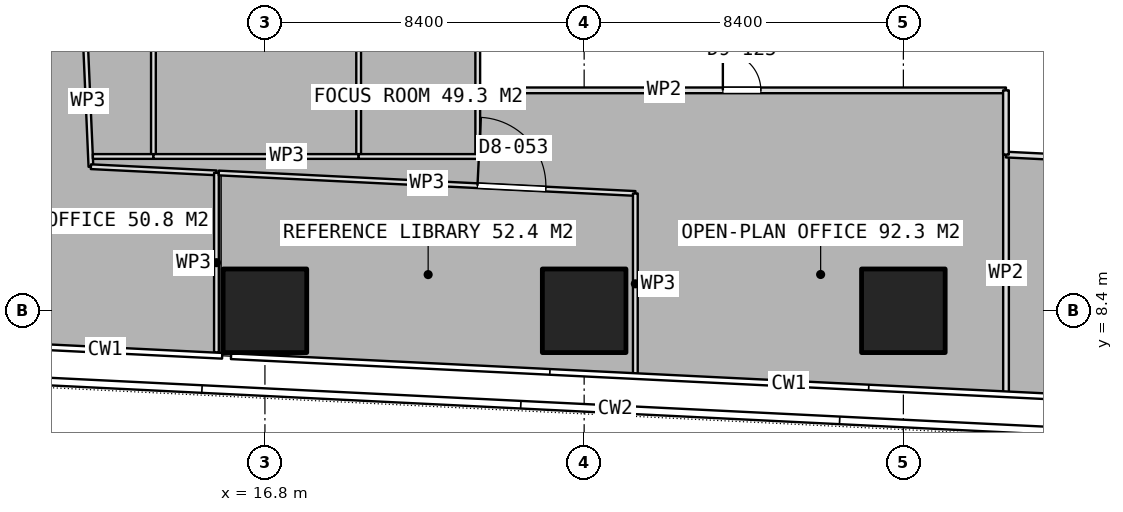
"""IFC4 building model, lengths in metres.
Left out: names, types, materials, properties, quantities, classifications, styles, units other than length and angle.
Written with IfcOpenShell. Run it as: python <this file> out.ifc"""

import sys

from ifc_helpers import new_model, si_unit, direction, frame, frame_2d, origin, origin_2d, place, context, subcontext, project, spatial, rectangle, extrude, element, fill, save


model = new_model("IFC4")
c1 = context("Model", 3, precision=1e-05, world=origin(), true_north=direction((0.0, 1.0)))
c2 = subcontext(c1, "Body", "Model", "MODEL_VIEW")
j1 = project(units=[si_unit("LENGTHUNIT", "METRE"), si_unit("PLANEANGLEUNIT", "RADIAN")], contexts=[c1])
p1 = place(None, origin())
s1 = spatial("IfcSite", under=j1, at=p1, CompositionType="ELEMENT")
p2 = place(p1, origin())
s2 = spatial("IfcBuilding", under=s1, at=p2, CompositionType="ELEMENT")
p3 = place(p2, frame((0.0, 0.0, 47.9)))
s3 = spatial("IfcBuildingStorey", under=s2, at=p3, CompositionType="ELEMENT", Elevation=47.9)
for number, where, z_axis, x_axis in (
    (1, (16.8, 8.4, 0.0), (0.0, 0.0, 1.0), (1.0, 0.0, 0.0)),
    (2, (25.2, 8.4, 0.0), (0.0, 0.0, 1.0), (1.0, 0.0, 0.0)),
    (3, (33.6, 8.4, 0.0), (0.0, 0.0, 1.0), (1.0, 0.0, 0.0)),
):
    element("IfcColumn", number, at=place(p3, frame(where, z_axis=z_axis, x_axis=x_axis)), inside=s3, PredefinedType="COLUMN", context=c2, shape_type="SweptSolid", body=[
        extrude(rectangle(XDim=2.2, YDim=2.2, at=origin_2d()), origin(), (0.0, 0.0, 1.0), 3.75),
    ])
p4 = place(p3, frame((36.301, 6.253, 0.0), z_axis=(0.0, 0.0, 1.0), x_axis=(0.0, 1.0, 0.0)))
e4 = element("IfcWall", 4, at=p4, inside=s3, PredefinedType="PARTITIONING", context=c2, shape_type="SweptSolid", body=[
    extrude(rectangle(XDim=6.257, YDim=0.15, at=frame_2d((3.128, 0.0))), origin(), (0.0, 0.0, 1.0), 3.5),
])
p5 = place(p3, frame((36.301, 12.51, 0.0), z_axis=(0.0, 0.0, 1.0), x_axis=(0.998801323594, -0.048948094823, 0.0)))
e5 = element("IfcWall", 5, at=p5, inside=s3, PredefinedType="PARTITIONING", context=c2, shape_type="SweptSolid", body=[
    extrude(rectangle(XDim=3.003, YDim=0.15, at=frame_2d((1.501, 0.0))), origin(), (0.0, 0.0, 1.0), 3.5),
])
p6 = place(p3, frame((12.07, 15.643, 0.0), z_axis=(0.0, 0.0, 1.0), x_axis=(0.043664115519, -0.999046267705, 0.0)))
e6 = element("IfcWall", 6, at=p6, inside=s3, PredefinedType="PARTITIONING", context=c2, shape_type="SweptSolid", body=[
    extrude(rectangle(XDim=3.455, YDim=0.125, at=frame_2d((1.728, 0.0))), origin(), (0.0, 0.0, 1.0), 3.5),
])
p7 = place(p3, frame((12.221, 12.191, 0.0), z_axis=(0.0, 0.0, 1.0), x_axis=(0.998801372368, -0.048947099555, 0.0)))
e7 = element("IfcWall", 7, at=p7, inside=s3, PredefinedType="PARTITIONING", context=c2, shape_type="SweptSolid", body=[
    extrude(rectangle(XDim=3.307, YDim=0.125, at=frame_2d((1.653, 0.0))), origin(), (0.0, 0.0, 1.0), 3.5),
])
p8 = place(p3, frame((15.524, 12.029, 0.0), z_axis=(0.0, 0.0, 1.0), x_axis=(0.0, -1.0, 0.0)))
e8 = element("IfcWall", 8, at=p8, inside=s3, PredefinedType="PARTITIONING", context=c2, shape_type="SweptSolid", body=[
    extrude(rectangle(XDim=4.726, YDim=0.125, at=frame_2d((2.363, 0.0))), origin(), (0.0, 0.0, 1.0), 3.5),
])
p9 = place(p3, frame((15.586, 12.026, 0.0), z_axis=(0.0, 0.0, 1.0), x_axis=(0.998793981911, -0.04909767508, 0.0)))
e9 = element("IfcWall", 9, at=p9, inside=s3, PredefinedType="PARTITIONING", context=c2, shape_type="SweptSolid", body=[
    extrude(rectangle(XDim=10.974, YDim=0.125, at=frame_2d((5.487, 0.0))), origin(), (0.0, 0.0, 1.0), 3.5),
])
p10 = place(p9, frame((6.815, 0.0, 0.0)))
e10 = element("IfcOpeningElement", 10, at=p10, cuts=e9, PredefinedType="OPENING", context=c2, shape_type="SweptSolid", body=[
    extrude(rectangle(XDim=1.8, YDim=2.1, at=frame_2d((0.9, 1.05))), frame((0.0, 0.073, 0.0), z_axis=(0.0, -1.0, 0.0), x_axis=(1.0, 0.0, 0.0)), (0.0, 0.0, 1.0), 0.145),
])
p11 = place(p3, frame((26.547, 11.487, 0.0), z_axis=(0.0, 0.0, 1.0), x_axis=(0.0, -1.0, 0.0)))
e11 = element("IfcWall", 11, at=p11, inside=s3, PredefinedType="PARTITIONING", context=c2, shape_type="SweptSolid", body=[
    extrude(rectangle(XDim=4.755, YDim=0.125, at=frame_2d((2.377, 0.0))), origin(), (0.0, 0.0, 1.0), 3.5),
])
p12 = place(p3, frame((13.866, 28.2, 0.0), z_axis=(0.0, 0.0, 1.0), x_axis=(0.0, -1.0, 0.0)))
e12 = element("IfcWall", 12, at=p12, inside=s3, PredefinedType="PARTITIONING", context=c2, shape_type="SweptSolid", body=[
    extrude(rectangle(XDim=15.74, YDim=0.125, at=frame_2d((7.87, 0.0))), origin(), (0.0, 0.0, 1.0), 3.5),
])
p13 = place(p3, frame((13.866, 12.46, 0.0), z_axis=(0.0, 0.0, 1.0), x_axis=(-1.0, 0.0, 0.0)))
e13 = element("IfcWall", 13, at=p13, inside=s3, PredefinedType="PARTITIONING", context=c2, shape_type="SweptSolid", body=[
    extrude(rectangle(XDim=1.594, YDim=0.125, at=frame_2d((0.797, 0.0))), origin(), (0.0, 0.0, 1.0), 3.5),
])
p14 = place(p3, frame((19.266, 28.2, 0.0), z_axis=(0.0, 0.0, 1.0), x_axis=(0.0, -1.0, 0.0)))
e14 = element("IfcWall", 14, at=p14, inside=s3, PredefinedType="PARTITIONING", context=c2, shape_type="SweptSolid", body=[
    extrude(rectangle(XDim=15.74, YDim=0.125, at=frame_2d((7.87, 0.0))), origin(), (0.0, 0.0, 1.0), 3.5),
])
p15 = place(p3, frame((19.266, 12.46, 0.0), z_axis=(0.0, 0.0, 1.0), x_axis=(-1.0, 0.0, 0.0)))
e15 = element("IfcWall", 15, at=p15, inside=s3, PredefinedType="PARTITIONING", context=c2, shape_type="SweptSolid", body=[
    extrude(rectangle(XDim=5.4, YDim=0.125, at=frame_2d((2.7, 0.0))), origin(), (0.0, 0.0, 1.0), 3.5),
])
p16 = place(p3, frame((22.4, 28.2, 0.0), z_axis=(0.0, 0.0, 1.0), x_axis=(0.0, -1.0, 0.0)))
e16 = element("IfcWall", 16, at=p16, inside=s3, PredefinedType="PARTITIONING", context=c2, shape_type="SweptSolid", body=[
    extrude(rectangle(XDim=15.74, YDim=0.125, at=frame_2d((7.87, 0.0))), origin(), (0.0, 0.0, 1.0), 3.5),
])
p17 = place(p16, frame((6.97, 0.0, 0.0)))
e17 = element("IfcOpeningElement", 17, at=p17, cuts=e16, PredefinedType="OPENING", context=c2, shape_type="SweptSolid", body=[
    extrude(rectangle(XDim=1.8, YDim=2.1, at=frame_2d((0.9, 1.05))), frame((0.0, 0.073, 0.0), z_axis=(0.0, -1.0, 0.0), x_axis=(1.0, 0.0, 0.0)), (0.0, 0.0, 1.0), 0.145),
])
p18 = place(p3, frame((22.4, 12.46, 0.0), z_axis=(0.0, 0.0, 1.0), x_axis=(-1.0, 0.0, 0.0)))
e18 = element("IfcWall", 18, at=p18, inside=s3, PredefinedType="PARTITIONING", context=c2, shape_type="SweptSolid", body=[
    extrude(rectangle(XDim=3.134, YDim=0.125, at=frame_2d((1.567, 0.0))), origin(), (0.0, 0.0, 1.0), 3.5),
])
p19 = place(p3, frame((22.462, 14.2, 0.0), z_axis=(0.0, 0.0, 1.0), x_axis=(1.0, 0.0, 0.0)))
e19 = element("IfcWall", 19, at=p19, inside=s3, PredefinedType="PARTITIONING", context=c2, shape_type="SweptSolid", body=[
    extrude(rectangle(XDim=13.837, YDim=0.15, at=frame_2d((6.918, 0.0))), origin(), (0.0, 0.0, 1.0), 3.5),
])
p20 = place(p19, frame((6.388, 0.0, 0.0)))
e20 = element("IfcOpeningElement", 20, at=p20, cuts=e19, PredefinedType="OPENING", context=c2, shape_type="SweptSolid", body=[
    extrude(rectangle(XDim=1.0, YDim=2.1, at=frame_2d((0.5, 1.05))), frame((0.0, 0.085, 0.0), z_axis=(0.0, -1.0, 0.0), x_axis=(1.0, 0.0, 0.0)), (0.0, 0.0, 1.0), 0.17),
])
p21 = place(p3, frame((36.299, 14.2, 0.0), z_axis=(0.0, 0.0, 1.0), x_axis=(0.0, -1.0, 0.0)))
e21 = element("IfcWall", 21, at=p21, inside=s3, PredefinedType="PARTITIONING", context=c2, shape_type="SweptSolid", body=[
    extrude(rectangle(XDim=1.69, YDim=0.15, at=frame_2d((0.845, 0.0))), origin(), (0.0, 0.0, 1.0), 3.5),
])
p22 = place(p10, origin())
e22 = element("IfcDoor", 22, at=p22, inside=s3, OperationType="DOUBLE_DOOR_SINGLE_SWING", PredefinedType="DOOR", context=c2, shape_type="SweptSolid", body=[
    extrude(rectangle(XDim=1.8, YDim=2.1, at=frame_2d((0.9, 1.05))), frame((0.0, 0.025, 0.0), z_axis=(0.0, -1.0, 0.0), x_axis=(1.0, 0.0, 0.0)), (0.0, 0.0, 1.0), 0.05),
])
fill(e10, e22)
p23 = place(p20, origin())
e23 = element("IfcDoor", 23, at=p23, inside=s3, OperationType="SINGLE_SWING_LEFT", PredefinedType="DOOR", context=c2, shape_type="SweptSolid", body=[
    extrude(rectangle(XDim=1.0, YDim=2.1, at=frame_2d((0.5, 1.05))), frame((0.0, 0.025, 0.0), z_axis=(0.0, -1.0, 0.0), x_axis=(1.0, 0.0, 0.0)), (0.0, 0.0, 1.0), 0.05),
])
fill(e20, e23)
save(model, sys.argv[1])
